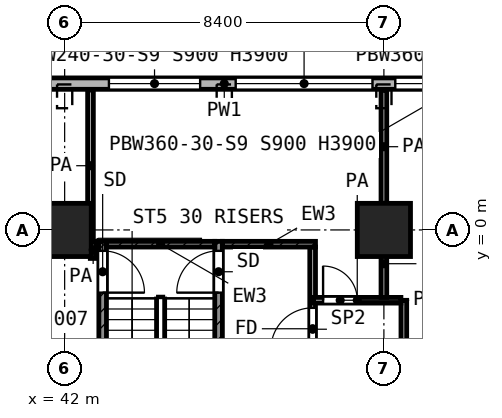
"""IFC4 building model, lengths in metres.
Left out: names, types, materials, properties, quantities, classifications, styles, units other than length and angle.
Written with IfcOpenShell. Run it as: python <this file> out.ifc"""

import sys

from ifc_helpers import new_model, si_unit, direction, frame, frame_2d, origin, origin_2d, place, context, subcontext, project, spatial, rectangle, extrude, element, fill, save


model = new_model("IFC4")
c1 = context("Model", 3, precision=1e-05, world=origin(), true_north=direction((0.0, 1.0)))
c2 = subcontext(c1, "Body", "Model", "MODEL_VIEW")
j1 = project(units=[si_unit("LENGTHUNIT", "METRE"), si_unit("PLANEANGLEUNIT", "RADIAN")], contexts=[c1])
p1 = place(None, origin())
s1 = spatial("IfcSite", under=j1, at=p1, CompositionType="ELEMENT")
p2 = place(p1, origin())
s2 = spatial("IfcBuilding", under=s1, at=p2, CompositionType="ELEMENT")
p3 = place(p2, frame((0.0, 0.0, 29.0)))
s3 = spatial("IfcBuildingStorey", under=s2, at=p3, CompositionType="ELEMENT", Elevation=29.0)
for number, where, z_axis, x_axis in (
    (1, (42.0, 0.0, 0.0), (0.0, 0.0, 1.0), (1.0, 0.0, 0.0)),
    (2, (50.4, 0.0, 0.0), (0.0, 0.0, 1.0), (1.0, 0.0, 0.0)),
):
    element("IfcColumn", number, at=place(p3, frame(where, z_axis=z_axis, x_axis=x_axis)), inside=s3, PredefinedType="COLUMN", context=c2, shape_type="SweptSolid", body=[
        extrude(rectangle(XDim=1.4, YDim=1.4, at=origin_2d()), origin(), (0.0, 0.0, 1.0), 5.2),
    ])
p4 = place(p3, frame((90.338, 3.85, 0.0), z_axis=(0.0, 0.0, 1.0), x_axis=(-1.0, 0.0, 0.0)))
e3 = element("IfcWall", 3, at=p4, inside=s3, PredefinedType="SOLIDWALL", context=c2, shape_type="SweptSolid", body=[
    extrude(rectangle(XDim=88.276, YDim=0.3, at=frame_2d((44.138, 0.0))), origin(), (0.0, 0.0, 1.0), 4.7),
])
p5 = place(p4, frame((0.438, 0.0, 0.9)))
e4 = element("IfcOpeningElement", 4, at=p5, cuts=e3, PredefinedType="OPENING", context=c2, shape_type="SweptSolid", body=[
    extrude(rectangle(XDim=1.2, YDim=3.0, at=frame_2d((0.6, 1.5))), frame((0.0, 0.16, 0.0), z_axis=(0.0, -1.0, 0.0), x_axis=(1.0, 0.0, 0.0)), (0.0, 0.0, 1.0), 0.32),
])
p6 = place(p4, frame((2.438, 0.0, 0.9)))
e5 = element("IfcOpeningElement", 5, at=p6, cuts=e3, PredefinedType="OPENING", context=c2, shape_type="SweptSolid", body=[
    extrude(rectangle(XDim=3.6, YDim=3.0, at=frame_2d((1.8, 1.5))), frame((0.0, 0.16, 0.0), z_axis=(0.0, -1.0, 0.0), x_axis=(1.0, 0.0, 0.0)), (0.0, 0.0, 1.0), 0.32),
])
p7 = place(p4, frame((6.638, 0.0, 0.9)))
e6 = element("IfcOpeningElement", 6, at=p7, cuts=e3, PredefinedType="OPENING", context=c2, shape_type="SweptSolid", body=[
    extrude(rectangle(XDim=3.6, YDim=3.0, at=frame_2d((1.8, 1.5))), frame((0.0, 0.16, 0.0), z_axis=(0.0, -1.0, 0.0), x_axis=(1.0, 0.0, 0.0)), (0.0, 0.0, 1.0), 0.32),
])
p8 = place(p4, frame((10.838, 0.0, 0.9)))
e7 = element("IfcOpeningElement", 7, at=p8, cuts=e3, PredefinedType="OPENING", context=c2, shape_type="SweptSolid", body=[
    extrude(rectangle(XDim=3.6, YDim=3.0, at=frame_2d((1.8, 1.5))), frame((0.0, 0.16, 0.0), z_axis=(0.0, -1.0, 0.0), x_axis=(1.0, 0.0, 0.0)), (0.0, 0.0, 1.0), 0.32),
])
p9 = place(p4, frame((15.038, 0.0, 0.9)))
e8 = element("IfcOpeningElement", 8, at=p9, cuts=e3, PredefinedType="OPENING", context=c2, shape_type="SweptSolid", body=[
    extrude(rectangle(XDim=3.6, YDim=3.0, at=frame_2d((1.8, 1.5))), frame((0.0, 0.16, 0.0), z_axis=(0.0, -1.0, 0.0), x_axis=(1.0, 0.0, 0.0)), (0.0, 0.0, 1.0), 0.32),
])
p10 = place(p4, frame((19.923, 0.0, 0.9)))
e9 = element("IfcOpeningElement", 9, at=p10, cuts=e3, PredefinedType="OPENING", context=c2, shape_type="SweptSolid", body=[
    extrude(rectangle(XDim=2.4, YDim=3.0, at=frame_2d((1.2, 1.5))), frame((0.0, 0.16, 0.0), z_axis=(0.0, -1.0, 0.0), x_axis=(1.0, 0.0, 0.0)), (0.0, 0.0, 1.0), 0.32),
])
p11 = place(p4, frame((23.438, 0.0, 0.9)))
e10 = element("IfcOpeningElement", 10, at=p11, cuts=e3, PredefinedType="OPENING", context=c2, shape_type="SweptSolid", body=[
    extrude(rectangle(XDim=3.6, YDim=3.0, at=frame_2d((1.8, 1.5))), frame((0.0, 0.16, 0.0), z_axis=(0.0, -1.0, 0.0), x_axis=(1.0, 0.0, 0.0)), (0.0, 0.0, 1.0), 0.32),
])
p12 = place(p4, frame((27.638, 0.0, 0.9)))
e11 = element("IfcOpeningElement", 11, at=p12, cuts=e3, PredefinedType="OPENING", context=c2, shape_type="SweptSolid", body=[
    extrude(rectangle(XDim=3.6, YDim=3.0, at=frame_2d((1.8, 1.5))), frame((0.0, 0.16, 0.0), z_axis=(0.0, -1.0, 0.0), x_axis=(1.0, 0.0, 0.0)), (0.0, 0.0, 1.0), 0.32),
])
p13 = place(p4, frame((31.838, 0.0, 0.9)))
e12 = element("IfcOpeningElement", 12, at=p13, cuts=e3, PredefinedType="OPENING", context=c2, shape_type="SweptSolid", body=[
    extrude(rectangle(XDim=3.6, YDim=3.0, at=frame_2d((1.8, 1.5))), frame((0.0, 0.16, 0.0), z_axis=(0.0, -1.0, 0.0), x_axis=(1.0, 0.0, 0.0)), (0.0, 0.0, 1.0), 0.32),
])
p14 = place(p4, frame((36.038, 0.0, 0.9)))
e13 = element("IfcOpeningElement", 13, at=p14, cuts=e3, PredefinedType="OPENING", context=c2, shape_type="SweptSolid", body=[
    extrude(rectangle(XDim=3.6, YDim=3.0, at=frame_2d((1.8, 1.5))), frame((0.0, 0.16, 0.0), z_axis=(0.0, -1.0, 0.0), x_axis=(1.0, 0.0, 0.0)), (0.0, 0.0, 1.0), 0.32),
])
p15 = place(p4, frame((40.238, 0.0, 0.9)))
e14 = element("IfcOpeningElement", 14, at=p15, cuts=e3, PredefinedType="OPENING", context=c2, shape_type="SweptSolid", body=[
    extrude(rectangle(XDim=3.6, YDim=3.0, at=frame_2d((1.8, 1.5))), frame((0.0, 0.16, 0.0), z_axis=(0.0, -1.0, 0.0), x_axis=(1.0, 0.0, 0.0)), (0.0, 0.0, 1.0), 0.32),
])
p16 = place(p4, frame((44.773, 0.0, 0.9)))
e15 = element("IfcOpeningElement", 15, at=p16, cuts=e3, PredefinedType="OPENING", context=c2, shape_type="SweptSolid", body=[
    extrude(rectangle(XDim=2.4, YDim=3.0, at=frame_2d((1.2, 1.5))), frame((0.0, 0.16, 0.0), z_axis=(0.0, -1.0, 0.0), x_axis=(1.0, 0.0, 0.0)), (0.0, 0.0, 1.0), 0.32),
])
p17 = place(p4, frame((49.173, 0.0, 0.9)))
e16 = element("IfcOpeningElement", 16, at=p17, cuts=e3, PredefinedType="OPENING", context=c2, shape_type="SweptSolid", body=[
    extrude(rectangle(XDim=2.4, YDim=3.0, at=frame_2d((1.2, 1.5))), frame((0.0, 0.16, 0.0), z_axis=(0.0, -1.0, 0.0), x_axis=(1.0, 0.0, 0.0)), (0.0, 0.0, 1.0), 0.32),
])
p18 = place(p4, frame((52.838, 0.0, 0.9)))
e17 = element("IfcOpeningElement", 17, at=p18, cuts=e3, PredefinedType="OPENING", context=c2, shape_type="SweptSolid", body=[
    extrude(rectangle(XDim=3.6, YDim=3.0, at=frame_2d((1.8, 1.5))), frame((0.0, 0.16, 0.0), z_axis=(0.0, -1.0, 0.0), x_axis=(1.0, 0.0, 0.0)), (0.0, 0.0, 1.0), 0.32),
])
p19 = place(p4, frame((57.038, 0.0, 0.9)))
e18 = element("IfcOpeningElement", 18, at=p19, cuts=e3, PredefinedType="OPENING", context=c2, shape_type="SweptSolid", body=[
    extrude(rectangle(XDim=3.6, YDim=3.0, at=frame_2d((1.8, 1.5))), frame((0.0, 0.16, 0.0), z_axis=(0.0, -1.0, 0.0), x_axis=(1.0, 0.0, 0.0)), (0.0, 0.0, 1.0), 0.32),
])
p20 = place(p4, frame((61.923, 0.0, 0.9)))
e19 = element("IfcOpeningElement", 19, at=p20, cuts=e3, PredefinedType="OPENING", context=c2, shape_type="SweptSolid", body=[
    extrude(rectangle(XDim=2.4, YDim=3.0, at=frame_2d((1.2, 1.5))), frame((0.0, 0.16, 0.0), z_axis=(0.0, -1.0, 0.0), x_axis=(1.0, 0.0, 0.0)), (0.0, 0.0, 1.0), 0.32),
])
p21 = place(p4, frame((65.438, 0.0, 0.9)))
e20 = element("IfcOpeningElement", 20, at=p21, cuts=e3, PredefinedType="OPENING", context=c2, shape_type="SweptSolid", body=[
    extrude(rectangle(XDim=3.6, YDim=3.0, at=frame_2d((1.8, 1.5))), frame((0.0, 0.16, 0.0), z_axis=(0.0, -1.0, 0.0), x_axis=(1.0, 0.0, 0.0)), (0.0, 0.0, 1.0), 0.32),
])
p22 = place(p4, frame((69.638, 0.0, 0.9)))
e21 = element("IfcOpeningElement", 21, at=p22, cuts=e3, PredefinedType="OPENING", context=c2, shape_type="SweptSolid", body=[
    extrude(rectangle(XDim=3.6, YDim=3.0, at=frame_2d((1.8, 1.5))), frame((0.0, 0.16, 0.0), z_axis=(0.0, -1.0, 0.0), x_axis=(1.0, 0.0, 0.0)), (0.0, 0.0, 1.0), 0.32),
])
p23 = place(p4, frame((73.838, 0.0, 0.9)))
e22 = element("IfcOpeningElement", 22, at=p23, cuts=e3, PredefinedType="OPENING", context=c2, shape_type="SweptSolid", body=[
    extrude(rectangle(XDim=3.6, YDim=3.0, at=frame_2d((1.8, 1.5))), frame((0.0, 0.16, 0.0), z_axis=(0.0, -1.0, 0.0), x_axis=(1.0, 0.0, 0.0)), (0.0, 0.0, 1.0), 0.32),
])
p24 = place(p4, frame((78.038, 0.0, 0.9)))
e23 = element("IfcOpeningElement", 23, at=p24, cuts=e3, PredefinedType="OPENING", context=c2, shape_type="SweptSolid", body=[
    extrude(rectangle(XDim=3.6, YDim=3.0, at=frame_2d((1.8, 1.5))), frame((0.0, 0.16, 0.0), z_axis=(0.0, -1.0, 0.0), x_axis=(1.0, 0.0, 0.0)), (0.0, 0.0, 1.0), 0.32),
])
p25 = place(p4, frame((82.238, 0.0, 0.9)))
e24 = element("IfcOpeningElement", 24, at=p25, cuts=e3, PredefinedType="OPENING", context=c2, shape_type="SweptSolid", body=[
    extrude(rectangle(XDim=3.6, YDim=3.0, at=frame_2d((1.8, 1.5))), frame((0.0, 0.16, 0.0), z_axis=(0.0, -1.0, 0.0), x_axis=(1.0, 0.0, 0.0)), (0.0, 0.0, 1.0), 0.32),
])
p26 = place(p4, frame((86.638, 0.0, 0.9)))
e25 = element("IfcOpeningElement", 25, at=p26, cuts=e3, PredefinedType="OPENING", context=c2, shape_type="SweptSolid", body=[
    extrude(rectangle(XDim=1.2, YDim=3.0, at=frame_2d((0.6, 1.5))), frame((0.0, 0.16, 0.0), z_axis=(0.0, -1.0, 0.0), x_axis=(1.0, 0.0, 0.0)), (0.0, 0.0, 1.0), 0.32),
])
p27 = place(p3, frame((43.0, -8.65, 0.0), z_axis=(0.0, 0.0, 1.0), x_axis=(0.0, 1.0, 0.0)))
e26 = element("IfcWall", 26, at=p27, inside=s3, PredefinedType="SHEAR", context=c2, shape_type="SweptSolid", body=[
    extrude(rectangle(XDim=8.35, YDim=0.2, at=frame_2d((4.175, 0.0))), origin(), (0.0, 0.0, 1.0), 4.7),
])
p28 = place(p27, frame((7.0, 0.0, 0.0)))
e27 = element("IfcOpeningElement", 27, at=p28, cuts=e26, PredefinedType="OPENING", context=c2, shape_type="SweptSolid", body=[
    extrude(rectangle(XDim=1.1, YDim=2.1, at=frame_2d((0.55, 1.05))), frame((0.0, 0.11, 0.0), z_axis=(0.0, -1.0, 0.0), x_axis=(1.0, 0.0, 0.0)), (0.0, 0.0, 1.0), 0.22),
])
p29 = place(p3, frame((46.05, -8.65, 0.0), z_axis=(0.0, 0.0, 1.0), x_axis=(0.0, 1.0, 0.0)))
e28 = element("IfcWall", 28, at=p29, inside=s3, PredefinedType="SHEAR", context=c2, shape_type="SweptSolid", body=[
    extrude(rectangle(XDim=8.35, YDim=0.2, at=frame_2d((4.175, 0.0))), origin(), (0.0, 0.0, 1.0), 4.7),
])
p30 = place(p29, frame((7.0, 0.0, 0.0)))
e29 = element("IfcOpeningElement", 29, at=p30, cuts=e28, PredefinedType="OPENING", context=c2, shape_type="SweptSolid", body=[
    extrude(rectangle(XDim=1.1, YDim=2.1, at=frame_2d((0.55, 1.05))), frame((0.0, 0.11, 0.0), z_axis=(0.0, -1.0, 0.0), x_axis=(1.0, 0.0, 0.0)), (0.0, 0.0, 1.0), 0.22),
])
p31 = place(p3, frame((43.1, -0.375, 0.0), z_axis=(0.0, 0.0, 1.0), x_axis=(1.0, 0.0, 0.0)))
e30 = element("IfcWall", 30, at=p31, inside=s3, PredefinedType="SHEAR", context=c2, shape_type="SweptSolid", body=[
    extrude(rectangle(XDim=2.85, YDim=0.15, at=frame_2d((1.425, 0.0))), origin(), (0.0, 0.0, 1.0), 4.7),
])
p32 = place(p3, frame((46.15, -0.375, 0.0), z_axis=(0.0, 0.0, 1.0), x_axis=(1.0, 0.0, 0.0)))
e31 = element("IfcWall", 31, at=p32, inside=s3, PredefinedType="SHEAR", context=c2, shape_type="SweptSolid", body=[
    extrude(rectangle(XDim=2.45, YDim=0.15, at=frame_2d((1.225, 0.0))), origin(), (0.0, 0.0, 1.0), 4.7),
])
p33 = place(p3, frame((48.525, -4.775, 0.0), z_axis=(0.0, 0.0, 1.0), x_axis=(0.0, 1.0, 0.0)))
e32 = element("IfcWall", 32, at=p33, inside=s3, PredefinedType="PARTITIONING", context=c2, shape_type="SweptSolid", body=[
    extrude(rectangle(XDim=4.325, YDim=0.15, at=frame_2d((2.163, 0.0))), origin(), (0.0, 0.0, 1.0), 4.7),
])
p34 = place(p33, frame((1.625, 0.0, 0.0)))
e33 = element("IfcOpeningElement", 33, at=p34, cuts=e32, PredefinedType="OPENING", context=c2, shape_type="SweptSolid", body=[
    extrude(rectangle(XDim=1.1, YDim=2.1, at=frame_2d((0.55, 1.05))), frame((0.0, 0.085, 0.0), z_axis=(0.0, -1.0, 0.0), x_axis=(1.0, 0.0, 0.0)), (0.0, 0.0, 1.0), 0.17),
])
p35 = place(p3, frame((48.55, -1.85, 0.0), z_axis=(0.0, 0.0, 1.0), x_axis=(1.0, 0.0, 0.0)))
e34 = element("IfcWall", 34, at=p35, inside=s3, PredefinedType="PARTITIONING", context=c2, shape_type="SweptSolid", body=[
    extrude(rectangle(XDim=2.298, YDim=0.15, at=frame_2d((1.149, 0.0))), origin(), (0.0, 0.0, 1.0), 4.7),
])
p36 = place(p35, frame((0.25, 0.0, 0.0)))
e35 = element("IfcOpeningElement", 35, at=p36, cuts=e34, PredefinedType="OPENING", context=c2, shape_type="SweptSolid", body=[
    extrude(rectangle(XDim=0.9, YDim=2.1, at=frame_2d((0.45, 1.05))), frame((0.0, 0.085, 0.0), z_axis=(0.0, -1.0, 0.0), x_axis=(1.0, 0.0, 0.0)), (0.0, 0.0, 1.0), 0.17),
])
p37 = place(p3, frame((42.68, -0.3, 0.0), z_axis=(0.0, 0.0, 1.0), x_axis=(0.0, 1.0, 0.0)))
e36 = element("IfcWall", 36, at=p37, inside=s3, PredefinedType="PARTITIONING", context=c2, shape_type="SweptSolid", body=[
    extrude(rectangle(XDim=3.98, YDim=0.15, at=frame_2d((1.99, 0.0))), origin(), (0.0, 0.0, 1.0), 4.7),
])
p38 = place(p3, frame((42.75, -0.75, 0.0), z_axis=(0.0, 0.0, 1.0), x_axis=(0.0, 1.0, 0.0)))
e37 = element("IfcWall", 37, at=p38, inside=s3, PredefinedType="PARTITIONING", context=c2, shape_type="SweptSolid", body=[
    extrude(rectangle(XDim=0.45, YDim=0.15, at=frame_2d((0.225, 0.0))), origin(), (0.0, 0.0, 1.0), 4.7),
])
p39 = place(p3, frame((50.4, -1.775, 0.0), z_axis=(0.0, 0.0, 1.0), x_axis=(0.0, 1.0, 0.0)))
e38 = element("IfcWall", 38, at=p39, inside=s3, PredefinedType="PARTITIONING", context=c2, shape_type="SweptSolid", body=[
    extrude(rectangle(XDim=1.773, YDim=0.15, at=frame_2d((0.886, 0.0))), origin(), (0.0, 0.0, 1.0), 4.7),
])
p40 = place(p3, frame((50.4, 0.7, 0.0), z_axis=(0.0, 0.0, 1.0), x_axis=(0.0, 1.0, 0.0)))
e39 = element("IfcWall", 39, at=p40, inside=s3, PredefinedType="PARTITIONING", context=c2, shape_type="SweptSolid", body=[
    extrude(rectangle(XDim=2.98, YDim=0.15, at=frame_2d((1.49, 0.0))), origin(), (0.0, 0.0, 1.0), 4.7),
])
p41 = place(p3, frame((50.925, -8.4, 0.0), z_axis=(0.0, 0.0, 1.0), x_axis=(0.0, 1.0, 0.0)))
e40 = element("IfcWall", 40, at=p41, inside=s3, PredefinedType="PARTITIONING", context=c2, shape_type="SweptSolid", body=[
    extrude(rectangle(XDim=6.548, YDim=0.15, at=frame_2d((3.274, 0.0))), origin(), (0.0, 0.0, 1.0), 4.7),
])
p42 = place(p14, origin())
e41 = element("IfcWindow", 41, at=p42, inside=s3, PartitioningType="SINGLE_PANEL", PredefinedType="WINDOW", context=c2, shape_type="SweptSolid", body=[
    extrude(rectangle(XDim=3.6, YDim=3.0, at=frame_2d((1.8, 1.5))), frame((0.0, 0.03, 0.0), z_axis=(0.0, -1.0, 0.0), x_axis=(1.0, 0.0, 0.0)), (0.0, 0.0, 1.0), 0.06),
])
fill(e13, e41)
p43 = place(p15, origin())
e42 = element("IfcWindow", 42, at=p43, inside=s3, PartitioningType="SINGLE_PANEL", PredefinedType="WINDOW", context=c2, shape_type="SweptSolid", body=[
    extrude(rectangle(XDim=3.6, YDim=3.0, at=frame_2d((1.8, 1.5))), frame((0.0, 0.03, 0.0), z_axis=(0.0, -1.0, 0.0), x_axis=(1.0, 0.0, 0.0)), (0.0, 0.0, 1.0), 0.06),
])
fill(e14, e42)
p44 = place(p16, origin())
e43 = element("IfcWindow", 43, at=p44, inside=s3, PartitioningType="SINGLE_PANEL", PredefinedType="WINDOW", context=c2, shape_type="SweptSolid", body=[
    extrude(rectangle(XDim=2.4, YDim=3.0, at=frame_2d((1.2, 1.5))), frame((0.0, 0.03, 0.0), z_axis=(0.0, -1.0, 0.0), x_axis=(1.0, 0.0, 0.0)), (0.0, 0.0, 1.0), 0.06),
])
fill(e15, e43)
p45 = place(p28, frame((1.1, 0.0, 0.0), z_axis=(0.0, 0.0, 1.0), x_axis=(-1.0, 0.0, 0.0)))
e44 = element("IfcDoor", 44, at=p45, inside=s3, OperationType="SINGLE_SWING_LEFT", PredefinedType="DOOR", context=c2, shape_type="SweptSolid", body=[
    extrude(rectangle(XDim=1.1, YDim=2.1, at=frame_2d((0.55, 1.05))), frame((0.0, 0.025, 0.0), z_axis=(0.0, -1.0, 0.0), x_axis=(1.0, 0.0, 0.0)), (0.0, 0.0, 1.0), 0.05),
])
fill(e27, e44)
p46 = place(p30, origin())
e45 = element("IfcDoor", 45, at=p46, inside=s3, OperationType="SINGLE_SWING_LEFT", PredefinedType="DOOR", context=c2, shape_type="SweptSolid", body=[
    extrude(rectangle(XDim=1.1, YDim=2.1, at=frame_2d((0.55, 1.05))), frame((0.0, 0.025, 0.0), z_axis=(0.0, -1.0, 0.0), x_axis=(1.0, 0.0, 0.0)), (0.0, 0.0, 1.0), 0.05),
])
fill(e29, e45)
p47 = place(p34, origin())
e46 = element("IfcDoor", 46, at=p47, inside=s3, OperationType="SINGLE_SWING_LEFT", PredefinedType="DOOR", context=c2, shape_type="SweptSolid", body=[
    extrude(rectangle(XDim=1.1, YDim=2.1, at=frame_2d((0.55, 1.05))), frame((0.0, 0.025, 0.0), z_axis=(0.0, -1.0, 0.0), x_axis=(1.0, 0.0, 0.0)), (0.0, 0.0, 1.0), 0.05),
])
fill(e33, e46)
p48 = place(p36, origin())
e47 = element("IfcDoor", 47, at=p48, inside=s3, OperationType="SINGLE_SWING_LEFT", PredefinedType="DOOR", context=c2, shape_type="SweptSolid", body=[
    extrude(rectangle(XDim=0.9, YDim=2.1, at=frame_2d((0.45, 1.05))), frame((0.0, 0.025, 0.0), z_axis=(0.0, -1.0, 0.0), x_axis=(1.0, 0.0, 0.0)), (0.0, 0.0, 1.0), 0.05),
])
fill(e35, e47)
save(model, sys.argv[1])
